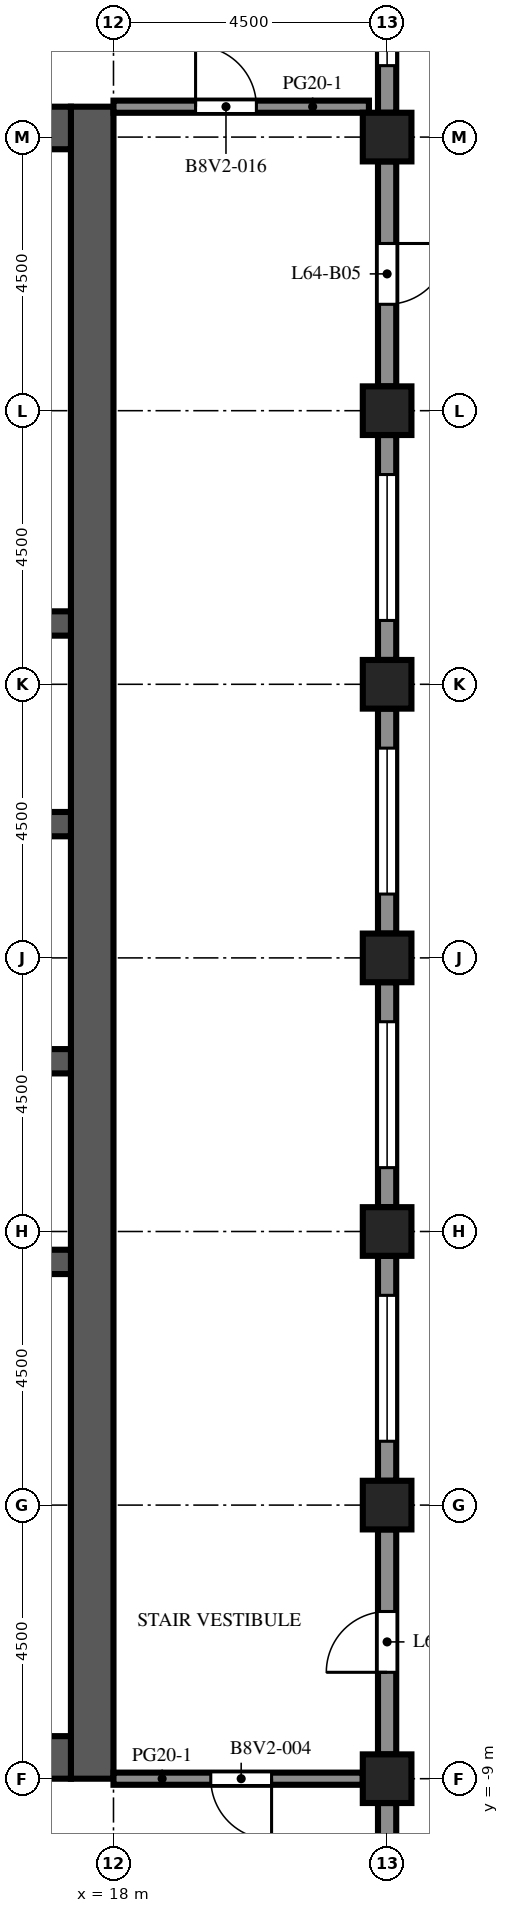
"""IFC4 building model, lengths in metres.
Left out: names, types, materials, properties, quantities, classifications, styles, units other than length and angle.
Written with IfcOpenShell. Run it as: python <this file> out.ifc"""

import sys

from ifc_helpers import new_model, si_unit, direction, frame, frame_2d, origin, origin_2d, place, context, subcontext, project, spatial, rectangle, extrude, element, fill, save


model = new_model("IFC4")
c1 = context("Model", 3, precision=1e-05, world=origin(), true_north=direction((0.0, 1.0)))
c2 = subcontext(c1, "Body", "Model", "MODEL_VIEW")
j1 = project(units=[si_unit("LENGTHUNIT", "METRE"), si_unit("PLANEANGLEUNIT", "RADIAN")], contexts=[c1])
p1 = place(None, origin())
s1 = spatial("IfcSite", under=j1, at=p1, CompositionType="ELEMENT")
p2 = place(p1, origin())
s2 = spatial("IfcBuilding", under=s1, at=p2, CompositionType="ELEMENT")
p3 = place(p2, frame((0.0, 0.0, 282.7)))
s3 = spatial("IfcBuildingStorey", under=s2, at=p3, CompositionType="ELEMENT", Elevation=282.7)
for number, where, z_axis, x_axis in (
    (1, (22.5, -9.0, 0.0), (0.0, 0.0, 1.0), (1.0, 0.0, 0.0)),
    (2, (22.5, -4.5, 0.0), (0.0, 0.0, 1.0), (1.0, 0.0, 0.0)),
    (3, (22.5, 0.0, 0.0), (0.0, 0.0, 1.0), (1.0, 0.0, 0.0)),
    (4, (22.5, 4.5, 0.0), (0.0, 0.0, 1.0), (1.0, 0.0, 0.0)),
    (5, (22.5, 9.0, 0.0), (0.0, 0.0, 1.0), (1.0, 0.0, 0.0)),
    (6, (22.5, 13.5, 0.0), (0.0, 0.0, 1.0), (1.0, 0.0, 0.0)),
    (7, (22.5, 18.0, 0.0), (0.0, 0.0, 1.0), (1.0, 0.0, 0.0)),
):
    element("IfcColumn", number, at=place(p3, frame(where, z_axis=z_axis, x_axis=x_axis)), inside=s3, PredefinedType="COLUMN", context=c2, shape_type="SweptSolid", body=[
        extrude(rectangle(XDim=0.8, YDim=0.8, at=origin_2d()), origin(), (0.0, 0.0, 1.0), 4.1),
    ])
p4 = place(p3, frame((17.65, -9.0, 0.0), z_axis=(0.0, 0.0, 1.0), x_axis=(0.0, 1.0, 0.0)))
e8 = element("IfcWall", 8, at=p4, inside=s3, PredefinedType="SHEAR", context=c2, shape_type="SweptSolid", body=[
    extrude(rectangle(XDim=27.5, YDim=0.7, at=frame_2d((13.75, 0.0))), origin(), (0.0, 0.0, 1.0), 4.1),
])
p5 = place(p4, frame((12.55, 0.0, 0.0)))
e9 = element("IfcOpeningElement", 9, at=p5, cuts=e8, PredefinedType="OPENING", context=c2, shape_type="SweptSolid", body=[
    extrude(rectangle(XDim=2.4, YDim=2.4, at=frame_2d((1.2, 1.2))), frame((0.0, 0.36, 0.0), z_axis=(0.0, -1.0, 0.0), x_axis=(1.0, 0.0, 0.0)), (0.0, 0.0, 1.0), 0.72),
])
p6 = place(p4, frame((6.825, 0.0, 0.0)))
e10 = element("IfcOpeningElement", 10, at=p6, cuts=e8, PredefinedType="OPENING", context=c2, shape_type="SweptSolid", body=[
    extrude(rectangle(XDim=1.2, YDim=2.1, at=frame_2d((0.6, 1.05))), frame((0.0, 0.36, 0.0), z_axis=(0.0, -1.0, 0.0), x_axis=(1.0, 0.0, 0.0)), (0.0, 0.0, 1.0), 0.72),
])
p7 = place(p4, frame((19.475, 0.0, 0.0)))
e11 = element("IfcOpeningElement", 11, at=p7, cuts=e8, PredefinedType="OPENING", context=c2, shape_type="SweptSolid", body=[
    extrude(rectangle(XDim=1.2, YDim=2.1, at=frame_2d((0.6, 1.05))), frame((0.0, 0.36, 0.0), z_axis=(0.0, -1.0, 0.0), x_axis=(1.0, 0.0, 0.0)), (0.0, 0.0, 1.0), 0.72),
])
for number, where, z_axis, x_axis in (
    (12, (6.7, -8.65, 0.0), (0.0, 0.0, 1.0), (1.0, 0.0, 0.0)),
    (13, (6.7, 18.15, 0.0), (0.0, 0.0, 1.0), (1.0, 0.0, 0.0)),
):
    element("IfcWall", number, at=place(p3, frame(where, z_axis=z_axis, x_axis=x_axis)), inside=s3, PredefinedType="SHEAR", context=c2, shape_type="SweptSolid", body=[
        extrude(rectangle(XDim=10.6, YDim=0.7, at=frame_2d((5.3, 0.0))), origin(), (0.0, 0.0, 1.0), 4.1),
    ])
p8 = place(p3, frame((6.7, -0.5, 0.0), z_axis=(0.0, 0.0, 1.0), x_axis=(1.0, 0.0, 0.0)))
e14 = element("IfcWall", 14, at=p8, inside=s3, PredefinedType="SHEAR", context=c2, shape_type="SweptSolid", body=[
    extrude(rectangle(XDim=10.6, YDim=0.4, at=frame_2d((5.3, 0.0))), origin(), (0.0, 0.0, 1.0), 4.1),
])
p9 = place(p3, frame((6.7, 2.8, 0.0), z_axis=(0.0, 0.0, 1.0), x_axis=(1.0, 0.0, 0.0)))
e15 = element("IfcWall", 15, at=p9, inside=s3, PredefinedType="SHEAR", context=c2, shape_type="SweptSolid", body=[
    extrude(rectangle(XDim=10.6, YDim=0.4, at=frame_2d((5.3, 0.0))), origin(), (0.0, 0.0, 1.0), 4.1),
])
p10 = place(p9, frame((0.688, 0.0, 0.0)))
e16 = element("IfcOpeningElement", 16, at=p10, cuts=e15, PredefinedType="OPENING", context=c2, shape_type="SweptSolid", body=[
    extrude(rectangle(XDim=1.1, YDim=2.1, at=frame_2d((0.55, 1.05))), frame((0.0, 0.21, 0.0), z_axis=(0.0, -1.0, 0.0), x_axis=(1.0, 0.0, 0.0)), (0.0, 0.0, 1.0), 0.42),
])
p11 = place(p9, frame((3.438, 0.0, 0.0)))
e17 = element("IfcOpeningElement", 17, at=p11, cuts=e15, PredefinedType="OPENING", context=c2, shape_type="SweptSolid", body=[
    extrude(rectangle(XDim=1.1, YDim=2.1, at=frame_2d((0.55, 1.05))), frame((0.0, 0.21, 0.0), z_axis=(0.0, -1.0, 0.0), x_axis=(1.0, 0.0, 0.0)), (0.0, 0.0, 1.0), 0.42),
])
p12 = place(p9, frame((6.113, 0.0, 0.0)))
e18 = element("IfcOpeningElement", 18, at=p12, cuts=e15, PredefinedType="OPENING", context=c2, shape_type="SweptSolid", body=[
    extrude(rectangle(XDim=1.0, YDim=2.1, at=frame_2d((0.5, 1.05))), frame((0.0, 0.21, 0.0), z_axis=(0.0, -1.0, 0.0), x_axis=(1.0, 0.0, 0.0)), (0.0, 0.0, 1.0), 0.42),
])
p13 = place(p9, frame((8.863, 0.0, 0.0)))
e19 = element("IfcOpeningElement", 19, at=p13, cuts=e15, PredefinedType="OPENING", context=c2, shape_type="SweptSolid", body=[
    extrude(rectangle(XDim=1.0, YDim=2.1, at=frame_2d((0.5, 1.05))), frame((0.0, 0.21, 0.0), z_axis=(0.0, -1.0, 0.0), x_axis=(1.0, 0.0, 0.0)), (0.0, 0.0, 1.0), 0.42),
])
p14 = place(p3, frame((6.7, 6.7, 0.0), z_axis=(0.0, 0.0, 1.0), x_axis=(1.0, 0.0, 0.0)))
e20 = element("IfcWall", 20, at=p14, inside=s3, PredefinedType="SHEAR", context=c2, shape_type="SweptSolid", body=[
    extrude(rectangle(XDim=10.6, YDim=0.4, at=frame_2d((5.3, 0.0))), origin(), (0.0, 0.0, 1.0), 4.1),
])
p15 = place(p14, frame((3.438, 0.0, 0.0)))
e21 = element("IfcOpeningElement", 21, at=p15, cuts=e20, PredefinedType="OPENING", context=c2, shape_type="SweptSolid", body=[
    extrude(rectangle(XDim=1.1, YDim=2.1, at=frame_2d((0.55, 1.05))), frame((0.0, 0.21, 0.0), z_axis=(0.0, -1.0, 0.0), x_axis=(1.0, 0.0, 0.0)), (0.0, 0.0, 1.0), 0.42),
])
p16 = place(p14, frame((6.062, 0.0, 0.0)))
e22 = element("IfcOpeningElement", 22, at=p16, cuts=e20, PredefinedType="OPENING", context=c2, shape_type="SweptSolid", body=[
    extrude(rectangle(XDim=1.1, YDim=2.1, at=frame_2d((0.55, 1.05))), frame((0.0, 0.21, 0.0), z_axis=(0.0, -1.0, 0.0), x_axis=(1.0, 0.0, 0.0)), (0.0, 0.0, 1.0), 0.42),
])
p17 = place(p14, frame((8.812, 0.0, 0.0)))
e23 = element("IfcOpeningElement", 23, at=p17, cuts=e20, PredefinedType="OPENING", context=c2, shape_type="SweptSolid", body=[
    extrude(rectangle(XDim=1.1, YDim=2.1, at=frame_2d((0.55, 1.05))), frame((0.0, 0.21, 0.0), z_axis=(0.0, -1.0, 0.0), x_axis=(1.0, 0.0, 0.0)), (0.0, 0.0, 1.0), 0.42),
])
p18 = place(p14, frame((0.738, 0.0, 0.0)))
e24 = element("IfcOpeningElement", 24, at=p18, cuts=e20, PredefinedType="OPENING", context=c2, shape_type="SweptSolid", body=[
    extrude(rectangle(XDim=1.0, YDim=2.1, at=frame_2d((0.5, 1.05))), frame((0.0, 0.21, 0.0), z_axis=(0.0, -1.0, 0.0), x_axis=(1.0, 0.0, 0.0)), (0.0, 0.0, 1.0), 0.42),
])
p19 = place(p3, frame((6.7, 10.0, 0.0), z_axis=(0.0, 0.0, 1.0), x_axis=(1.0, 0.0, 0.0)))
e25 = element("IfcWall", 25, at=p19, inside=s3, PredefinedType="SHEAR", context=c2, shape_type="SweptSolid", body=[
    extrude(rectangle(XDim=10.6, YDim=0.4, at=frame_2d((5.3, 0.0))), origin(), (0.0, 0.0, 1.0), 4.1),
])
p20 = place(p3, frame((22.5, -9.4, 0.0), z_axis=(0.0, 0.0, 1.0), x_axis=(0.0, -1.0, 0.0)))
e26 = element("IfcWall", 26, at=p20, inside=s3, PredefinedType="SOLIDWALL", context=c2, shape_type="SweptSolid", body=[
    extrude(rectangle(XDim=3.7, YDim=0.3, at=frame_2d((1.85, 0.0))), origin(), (0.0, 0.0, 1.0), 2.85),
])
p21 = place(p20, frame((0.65, 0.0, 0.8)))
e27 = element("IfcOpeningElement", 27, at=p21, cuts=e26, PredefinedType="OPENING", context=c2, shape_type="SweptSolid", body=[
    extrude(rectangle(XDim=2.4, YDim=1.7, at=frame_2d((1.2, 0.85))), frame((0.0, 0.16, 0.0), z_axis=(0.0, -1.0, 0.0), x_axis=(1.0, 0.0, 0.0)), (0.0, 0.0, 1.0), 0.32),
])
p22 = place(p3, frame((22.5, -4.9, 0.0), z_axis=(0.0, 0.0, 1.0), x_axis=(0.0, -1.0, 0.0)))
e28 = element("IfcWall", 28, at=p22, inside=s3, PredefinedType="SOLIDWALL", context=c2, shape_type="SweptSolid", body=[
    extrude(rectangle(XDim=3.7, YDim=0.3, at=frame_2d((1.85, 0.0))), origin(), (0.0, 0.0, 1.0), 2.85),
])
p23 = place(p22, frame((1.35, 0.0, 0.0)))
e29 = element("IfcOpeningElement", 29, at=p23, cuts=e28, PredefinedType="OPENING", context=c2, shape_type="SweptSolid", body=[
    extrude(rectangle(XDim=1.0, YDim=2.2, at=frame_2d((0.5, 1.1))), frame((0.0, 0.16, 0.0), z_axis=(0.0, -1.0, 0.0), x_axis=(1.0, 0.0, 0.0)), (0.0, 0.0, 1.0), 0.32),
])
p24 = place(p3, frame((22.5, -0.4, 0.0), z_axis=(0.0, 0.0, 1.0), x_axis=(0.0, -1.0, 0.0)))
e30 = element("IfcWall", 30, at=p24, inside=s3, PredefinedType="SOLIDWALL", context=c2, shape_type="SweptSolid", body=[
    extrude(rectangle(XDim=3.7, YDim=0.3, at=frame_2d((1.85, 0.0))), origin(), (0.0, 0.0, 1.0), 2.85),
])
p25 = place(p24, frame((0.65, 0.0, 0.8)))
e31 = element("IfcOpeningElement", 31, at=p25, cuts=e30, PredefinedType="OPENING", context=c2, shape_type="SweptSolid", body=[
    extrude(rectangle(XDim=2.4, YDim=1.7, at=frame_2d((1.2, 0.85))), frame((0.0, 0.16, 0.0), z_axis=(0.0, -1.0, 0.0), x_axis=(1.0, 0.0, 0.0)), (0.0, 0.0, 1.0), 0.32),
])
p26 = place(p3, frame((22.5, 4.1, 0.0), z_axis=(0.0, 0.0, 1.0), x_axis=(0.0, -1.0, 0.0)))
e32 = element("IfcWall", 32, at=p26, inside=s3, PredefinedType="SOLIDWALL", context=c2, shape_type="SweptSolid", body=[
    extrude(rectangle(XDim=3.7, YDim=0.3, at=frame_2d((1.85, 0.0))), origin(), (0.0, 0.0, 1.0), 2.85),
])
p27 = place(p26, frame((0.65, 0.0, 0.8)))
e33 = element("IfcOpeningElement", 33, at=p27, cuts=e32, PredefinedType="OPENING", context=c2, shape_type="SweptSolid", body=[
    extrude(rectangle(XDim=2.4, YDim=1.7, at=frame_2d((1.2, 0.85))), frame((0.0, 0.16, 0.0), z_axis=(0.0, -1.0, 0.0), x_axis=(1.0, 0.0, 0.0)), (0.0, 0.0, 1.0), 0.32),
])
p28 = place(p3, frame((22.5, 8.6, 0.0), z_axis=(0.0, 0.0, 1.0), x_axis=(0.0, -1.0, 0.0)))
e34 = element("IfcWall", 34, at=p28, inside=s3, PredefinedType="SOLIDWALL", context=c2, shape_type="SweptSolid", body=[
    extrude(rectangle(XDim=3.7, YDim=0.3, at=frame_2d((1.85, 0.0))), origin(), (0.0, 0.0, 1.0), 2.85),
])
p29 = place(p28, frame((0.65, 0.0, 0.8)))
e35 = element("IfcOpeningElement", 35, at=p29, cuts=e34, PredefinedType="OPENING", context=c2, shape_type="SweptSolid", body=[
    extrude(rectangle(XDim=2.4, YDim=1.7, at=frame_2d((1.2, 0.85))), frame((0.0, 0.16, 0.0), z_axis=(0.0, -1.0, 0.0), x_axis=(1.0, 0.0, 0.0)), (0.0, 0.0, 1.0), 0.32),
])
p30 = place(p3, frame((22.5, 13.1, 0.0), z_axis=(0.0, 0.0, 1.0), x_axis=(0.0, -1.0, 0.0)))
e36 = element("IfcWall", 36, at=p30, inside=s3, PredefinedType="SOLIDWALL", context=c2, shape_type="SweptSolid", body=[
    extrude(rectangle(XDim=3.7, YDim=0.3, at=frame_2d((1.85, 0.0))), origin(), (0.0, 0.0, 1.0), 2.85),
])
p31 = place(p30, frame((0.65, 0.0, 0.8)))
e37 = element("IfcOpeningElement", 37, at=p31, cuts=e36, PredefinedType="OPENING", context=c2, shape_type="SweptSolid", body=[
    extrude(rectangle(XDim=2.4, YDim=1.7, at=frame_2d((1.2, 0.85))), frame((0.0, 0.16, 0.0), z_axis=(0.0, -1.0, 0.0), x_axis=(1.0, 0.0, 0.0)), (0.0, 0.0, 1.0), 0.32),
])
p32 = place(p3, frame((22.5, 17.6, 0.0), z_axis=(0.0, 0.0, 1.0), x_axis=(0.0, -1.0, 0.0)))
e38 = element("IfcWall", 38, at=p32, inside=s3, PredefinedType="SOLIDWALL", context=c2, shape_type="SweptSolid", body=[
    extrude(rectangle(XDim=3.7, YDim=0.3, at=frame_2d((1.85, 0.0))), origin(), (0.0, 0.0, 1.0), 2.85),
])
p33 = place(p32, frame((1.35, 0.0, 0.0)))
e39 = element("IfcOpeningElement", 39, at=p33, cuts=e38, PredefinedType="OPENING", context=c2, shape_type="SweptSolid", body=[
    extrude(rectangle(XDim=1.0, YDim=2.2, at=frame_2d((0.5, 1.1))), frame((0.0, 0.16, 0.0), z_axis=(0.0, -1.0, 0.0), x_axis=(1.0, 0.0, 0.0)), (0.0, 0.0, 1.0), 0.32),
])
p34 = place(p3, frame((22.5, 22.1, 0.0), z_axis=(0.0, 0.0, 1.0), x_axis=(0.0, -1.0, 0.0)))
e40 = element("IfcWall", 40, at=p34, inside=s3, PredefinedType="SOLIDWALL", context=c2, shape_type="SweptSolid", body=[
    extrude(rectangle(XDim=3.7, YDim=0.3, at=frame_2d((1.85, 0.0))), origin(), (0.0, 0.0, 1.0), 2.85),
])
p35 = place(p34, frame((0.525, 0.0, 0.8)))
e41 = element("IfcOpeningElement", 41, at=p35, cuts=e40, PredefinedType="OPENING", context=c2, shape_type="SweptSolid", body=[
    extrude(rectangle(XDim=2.4, YDim=1.7, at=frame_2d((1.2, 0.85))), frame((0.0, 0.16, 0.0), z_axis=(0.0, -1.0, 0.0), x_axis=(1.0, 0.0, 0.0)), (0.0, 0.0, 1.0), 0.32),
])
p36 = place(p3, frame((22.1, -9.0, 0.0), z_axis=(0.0, 0.0, 1.0), x_axis=(-1.0, 0.0, 0.0)))
e42 = element("IfcWall", 42, at=p36, inside=s3, PredefinedType="PARTITIONING", context=c2, shape_type="SweptSolid", body=[
    extrude(rectangle(XDim=4.1, YDim=0.2, at=frame_2d((2.05, 0.0))), origin(), (0.0, 0.0, 1.0), 3.65),
])
p37 = place(p36, frame((1.5, 0.0, 0.0)))
e43 = element("IfcOpeningElement", 43, at=p37, cuts=e42, PredefinedType="OPENING", context=c2, shape_type="SweptSolid", body=[
    extrude(rectangle(XDim=1.0, YDim=2.1, at=frame_2d((0.5, 1.05))), frame((0.0, 0.11, 0.0), z_axis=(0.0, -1.0, 0.0), x_axis=(1.0, 0.0, 0.0)), (0.0, 0.0, 1.0), 0.22),
])
p38 = place(p3, frame((18.0, 18.5, 0.0), z_axis=(0.0, 0.0, 1.0), x_axis=(1.0, 0.0, 0.0)))
e44 = element("IfcWall", 44, at=p38, inside=s3, PredefinedType="PARTITIONING", context=c2, shape_type="SweptSolid", body=[
    extrude(rectangle(XDim=4.201, YDim=0.2, at=frame_2d((2.101, 0.0))), origin(), (0.0, 0.0, 1.0), 3.65),
])
p39 = place(p38, frame((1.35, 0.0, 0.0)))
e45 = element("IfcOpeningElement", 45, at=p39, cuts=e44, PredefinedType="OPENING", context=c2, shape_type="SweptSolid", body=[
    extrude(rectangle(XDim=1.0, YDim=2.1, at=frame_2d((0.5, 1.05))), frame((0.0, 0.11, 0.0), z_axis=(0.0, -1.0, 0.0), x_axis=(1.0, 0.0, 0.0)), (0.0, 0.0, 1.0), 0.22),
])
p40 = place(p23, origin())
e46 = element("IfcDoor", 46, at=p40, inside=s3, OperationType="SINGLE_SWING_RIGHT", PredefinedType="DOOR", context=c2, shape_type="SweptSolid", body=[
    extrude(rectangle(XDim=1.0, YDim=2.2, at=frame_2d((0.5, 1.1))), frame((0.0, 0.025, 0.0), z_axis=(0.0, -1.0, 0.0), x_axis=(1.0, 0.0, 0.0)), (0.0, 0.0, 1.0), 0.05),
])
fill(e29, e46)
p41 = place(p25, origin())
e47 = element("IfcWindow", 47, at=p41, inside=s3, PartitioningType="SINGLE_PANEL", PredefinedType="WINDOW", context=c2, shape_type="SweptSolid", body=[
    extrude(rectangle(XDim=2.4, YDim=1.7, at=frame_2d((1.2, 0.85))), frame((0.0, 0.03, 0.0), z_axis=(0.0, -1.0, 0.0), x_axis=(1.0, 0.0, 0.0)), (0.0, 0.0, 1.0), 0.06),
])
fill(e31, e47)
p42 = place(p27, origin())
e48 = element("IfcWindow", 48, at=p42, inside=s3, PartitioningType="SINGLE_PANEL", PredefinedType="WINDOW", context=c2, shape_type="SweptSolid", body=[
    extrude(rectangle(XDim=2.4, YDim=1.7, at=frame_2d((1.2, 0.85))), frame((0.0, 0.03, 0.0), z_axis=(0.0, -1.0, 0.0), x_axis=(1.0, 0.0, 0.0)), (0.0, 0.0, 1.0), 0.06),
])
fill(e33, e48)
p43 = place(p29, origin())
e49 = element("IfcWindow", 49, at=p43, inside=s3, PartitioningType="SINGLE_PANEL", PredefinedType="WINDOW", context=c2, shape_type="SweptSolid", body=[
    extrude(rectangle(XDim=2.4, YDim=1.7, at=frame_2d((1.2, 0.85))), frame((0.0, 0.03, 0.0), z_axis=(0.0, -1.0, 0.0), x_axis=(1.0, 0.0, 0.0)), (0.0, 0.0, 1.0), 0.06),
])
fill(e35, e49)
p44 = place(p31, origin())
e50 = element("IfcWindow", 50, at=p44, inside=s3, PartitioningType="SINGLE_PANEL", PredefinedType="WINDOW", context=c2, shape_type="SweptSolid", body=[
    extrude(rectangle(XDim=2.4, YDim=1.7, at=frame_2d((1.2, 0.85))), frame((0.0, 0.03, 0.0), z_axis=(0.0, -1.0, 0.0), x_axis=(1.0, 0.0, 0.0)), (0.0, 0.0, 1.0), 0.06),
])
fill(e37, e50)
p45 = place(p33, origin())
e51 = element("IfcDoor", 51, at=p45, inside=s3, OperationType="SINGLE_SWING_LEFT", PredefinedType="DOOR", context=c2, shape_type="SweptSolid", body=[
    extrude(rectangle(XDim=1.0, YDim=2.2, at=frame_2d((0.5, 1.1))), frame((0.0, 0.025, 0.0), z_axis=(0.0, -1.0, 0.0), x_axis=(1.0, 0.0, 0.0)), (0.0, 0.0, 1.0), 0.05),
])
fill(e39, e51)
p46 = place(p35, origin())
e52 = element("IfcWindow", 52, at=p46, inside=s3, PartitioningType="SINGLE_PANEL", PredefinedType="WINDOW", context=c2, shape_type="SweptSolid", body=[
    extrude(rectangle(XDim=2.4, YDim=1.7, at=frame_2d((1.2, 0.85))), frame((0.0, 0.03, 0.0), z_axis=(0.0, -1.0, 0.0), x_axis=(1.0, 0.0, 0.0)), (0.0, 0.0, 1.0), 0.06),
])
fill(e41, e52)
p47 = place(p5, origin())
e53 = element("IfcDoor", 53, at=p47, inside=s3, OperationType="DOUBLE_DOOR_DOUBLE_SWING", PredefinedType="DOOR", context=c2, shape_type="SweptSolid", body=[
    extrude(rectangle(XDim=2.4, YDim=2.4, at=frame_2d((1.2, 1.2))), frame((0.0, 0.025, 0.0), z_axis=(0.0, -1.0, 0.0), x_axis=(1.0, 0.0, 0.0)), (0.0, 0.0, 1.0), 0.05),
])
fill(e9, e53)
p48 = place(p6, frame((1.2, 0.0, 0.0), z_axis=(0.0, 0.0, 1.0), x_axis=(-1.0, 0.0, 0.0)))
e54 = element("IfcDoor", 54, at=p48, inside=s3, OperationType="SINGLE_SWING_LEFT", PredefinedType="DOOR", context=c2, shape_type="SweptSolid", body=[
    extrude(rectangle(XDim=1.2, YDim=2.1, at=frame_2d((0.6, 1.05))), frame((0.0, 0.025, 0.0), z_axis=(0.0, -1.0, 0.0), x_axis=(1.0, 0.0, 0.0)), (0.0, 0.0, 1.0), 0.05),
])
fill(e10, e54)
p49 = place(p7, frame((1.2, 0.0, 0.0), z_axis=(0.0, 0.0, 1.0), x_axis=(-1.0, 0.0, 0.0)))
e55 = element("IfcDoor", 55, at=p49, inside=s3, OperationType="SINGLE_SWING_LEFT", PredefinedType="DOOR", context=c2, shape_type="SweptSolid", body=[
    extrude(rectangle(XDim=1.2, YDim=2.1, at=frame_2d((0.6, 1.05))), frame((0.0, 0.025, 0.0), z_axis=(0.0, -1.0, 0.0), x_axis=(1.0, 0.0, 0.0)), (0.0, 0.0, 1.0), 0.05),
])
fill(e11, e55)
p50 = place(p37, origin())
e56 = element("IfcDoor", 56, at=p50, inside=s3, OperationType="SINGLE_SWING_LEFT", PredefinedType="DOOR", context=c2, shape_type="SweptSolid", body=[
    extrude(rectangle(XDim=1.0, YDim=2.1, at=frame_2d((0.5, 1.05))), frame((0.0, 0.025, 0.0), z_axis=(0.0, -1.0, 0.0), x_axis=(1.0, 0.0, 0.0)), (0.0, 0.0, 1.0), 0.05),
])
fill(e43, e56)
p51 = place(p39, origin())
e57 = element("IfcDoor", 57, at=p51, inside=s3, OperationType="SINGLE_SWING_LEFT", PredefinedType="DOOR", context=c2, shape_type="SweptSolid", body=[
    extrude(rectangle(XDim=1.0, YDim=2.1, at=frame_2d((0.5, 1.05))), frame((0.0, 0.025, 0.0), z_axis=(0.0, -1.0, 0.0), x_axis=(1.0, 0.0, 0.0)), (0.0, 0.0, 1.0), 0.05),
])
fill(e45, e57)
save(model, sys.argv[1])
